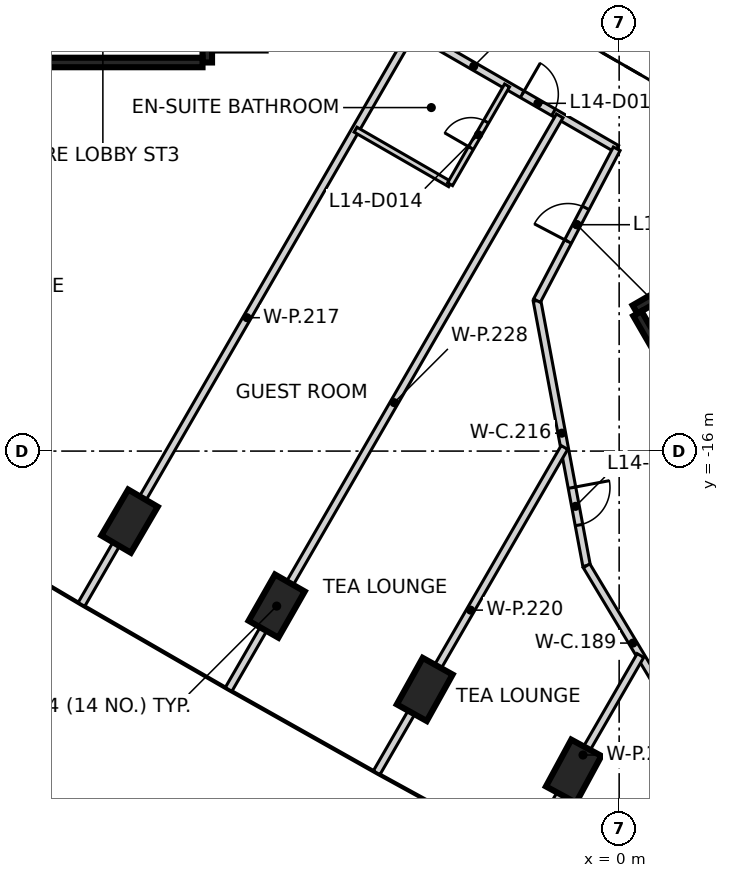
"""IFC4 building model, lengths in metres.
Left out: names, types, materials, properties, quantities, classifications, styles, units other than length and angle.
Written with IfcOpenShell. Run it as: python <this file> out.ifc"""

import sys

from ifc_helpers import new_model, si_unit, direction, frame, frame_2d, origin, origin_2d, place, context, subcontext, project, spatial, rectangle, extrude, element, fill, save


model = new_model("IFC4")
c1 = context("Model", 3, precision=1e-05, world=origin(), true_north=direction((0.0, 1.0)))
c2 = subcontext(c1, "Body", "Model", "MODEL_VIEW")
j1 = project(units=[si_unit("LENGTHUNIT", "METRE"), si_unit("PLANEANGLEUNIT", "RADIAN")], contexts=[c1])
p1 = place(None, origin())
s1 = spatial("IfcSite", under=j1, at=p1, CompositionType="ELEMENT")
p2 = place(p1, origin())
s2 = spatial("IfcBuilding", under=s1, at=p2, CompositionType="ELEMENT")
p3 = place(p2, frame((0.0, 0.0, 63.8)))
s3 = spatial("IfcBuildingStorey", under=s2, at=p3, CompositionType="ELEMENT", Elevation=63.8)
for number, where, z_axis, x_axis in (
    (1, (-12.883, -17.844, -0.475), (0.0, 0.0, 1.0), (0.505, 0.863, 0.0)),
    (2, (-9.011, -20.079, -0.475), (0.0, 0.0, 1.0), (0.495, 0.869, 0.0)),
    (3, (-5.116, -22.272, -0.475), (0.0, 0.0, 1.0), (0.486, 0.874, 0.0)),
    (4, (-1.197, -24.423, -0.475), (0.0, 0.0, 1.0), (0.476, 0.879, 0.0)),
):
    element("IfcColumn", number, at=place(p3, frame(where, z_axis=z_axis, x_axis=x_axis)), inside=s3, PredefinedType="COLUMN", context=c2, shape_type="SweptSolid", body=[
        extrude(rectangle(XDim=1.4, YDim=0.9, at=origin_2d()), origin(), (0.0, 0.0, 1.0), 3.6),
    ])
p4 = place(p3, frame((-10.837, 5.775, 0.0), z_axis=(0.0, 0.0, 1.0), x_axis=(0.0, -1.0, 0.0)))
e5 = element("IfcWall", 5, at=p4, inside=s3, PredefinedType="SHEAR", context=c2, shape_type="SweptSolid", body=[
    extrude(rectangle(XDim=11.55, YDim=0.25, at=frame_2d((5.775, 0.0))), origin(), (0.0, 0.0, 1.0), 3.125),
])
p5 = place(p4, frame((10.025, 0.0, 0.0)))
e6 = element("IfcOpeningElement", 6, at=p5, cuts=e5, PredefinedType="OPENING", context=c2, shape_type="SweptSolid", body=[
    extrude(rectangle(XDim=1.2, YDim=2.1, at=frame_2d((0.6, 1.05))), frame((0.0, 0.135, 0.0), z_axis=(0.0, -1.0, 0.0), x_axis=(1.0, 0.0, 0.0)), (0.0, 0.0, 1.0), 0.27),
])
p6 = place(p4, frame((8.725, 0.0, 0.0)))
e7 = element("IfcOpeningElement", 7, at=p6, cuts=e5, PredefinedType="OPENING", context=c2, shape_type="SweptSolid", body=[
    extrude(rectangle(XDim=1.2, YDim=2.1, at=frame_2d((0.6, 1.05))), frame((0.0, 0.135, 0.0), z_axis=(0.0, -1.0, 0.0), x_axis=(1.0, 0.0, 0.0)), (0.0, 0.0, 1.0), 0.27),
])
p7 = place(p3, frame((-10.963, -5.775, 0.0), z_axis=(0.0, 0.0, 1.0), x_axis=(-1.0, 0.0, 0.0)))
e8 = element("IfcWall", 8, at=p7, inside=s3, PredefinedType="SHEAR", context=c2, shape_type="SweptSolid", body=[
    extrude(rectangle(XDim=5.225, YDim=0.25, at=frame_2d((2.612, 0.0))), origin(), (0.0, 0.0, 1.0), 3.125),
])
p8 = place(p3, frame((0.417, -12.273, 0.0), z_axis=(0.0, 0.0, 1.0), x_axis=(0.866021906294, 0.500006057782, 0.0)))
e9 = element("IfcWall", 9, at=p8, inside=s3, PredefinedType="SHEAR", context=c2, shape_type="SweptSolid", body=[
    extrude(rectangle(XDim=11.55, YDim=0.25, at=frame_2d((5.775, 0.0))), origin(), (0.0, 0.0, 1.0), 3.125),
])
p9 = place(p8, frame((10.025, 0.0, 0.0)))
e10 = element("IfcOpeningElement", 10, at=p9, cuts=e9, PredefinedType="OPENING", context=c2, shape_type="SweptSolid", body=[
    extrude(rectangle(XDim=1.2, YDim=2.1, at=frame_2d((0.6, 1.05))), frame((0.0, 0.135, 0.0), z_axis=(0.0, -1.0, 0.0), x_axis=(1.0, 0.0, 0.0)), (0.0, 0.0, 1.0), 0.27),
])
p10 = place(p8, frame((8.725, 0.0, 0.0)))
e11 = element("IfcOpeningElement", 11, at=p10, cuts=e9, PredefinedType="OPENING", context=c2, shape_type="SweptSolid", body=[
    extrude(rectangle(XDim=1.2, YDim=2.1, at=frame_2d((0.6, 1.05))), frame((0.0, 0.135, 0.0), z_axis=(0.0, -1.0, 0.0), x_axis=(1.0, 0.0, 0.0)), (0.0, 0.0, 1.0), 0.27),
])
p11 = place(p3, frame((3.235, -17.153, 0.0), z_axis=(0.0, 0.0, 1.0), x_axis=(-0.500008851346, 0.866020293397, 0.0)))
e12 = element("IfcWall", 12, at=p11, inside=s3, PredefinedType="SHEAR", context=c2, shape_type="SweptSolid", body=[
    extrude(rectangle(XDim=5.51, YDim=0.25, at=frame_2d((2.755, 0.0))), origin(), (0.0, 0.0, 1.0), 3.125),
])
p12 = place(p3, frame((-7.589, -3.702, 0.0), z_axis=(0.0, 0.0, 1.0), x_axis=(0.865995139556, -0.500052415518, 0.0)))
e13 = element("IfcWall", 13, at=p12, inside=s3, PredefinedType="PARTITIONING", context=c2, shape_type="SweptSolid", body=[
    extrude(rectangle(XDim=8.689, YDim=0.2, at=frame_2d((4.344, 0.0))), origin(), (0.0, 0.0, 1.0), 3.125),
])
p13 = place(p12, frame((0.749, 0.0, 0.0)))
e14 = element("IfcOpeningElement", 14, at=p13, cuts=e13, PredefinedType="OPENING", context=c2, shape_type="SweptSolid", body=[
    extrude(rectangle(XDim=1.0, YDim=2.1, at=frame_2d((0.5, 1.05))), frame((0.0, 0.11, 0.0), z_axis=(0.0, -1.0, 0.0), x_axis=(1.0, 0.0, 0.0)), (0.0, 0.0, 1.0), 0.22),
])
p14 = place(p12, frame((5.819, 0.0, 0.0)))
e15 = element("IfcOpeningElement", 15, at=p14, cuts=e13, PredefinedType="OPENING", context=c2, shape_type="SweptSolid", body=[
    extrude(rectangle(XDim=0.95, YDim=2.1, at=frame_2d((0.475, 1.05))), frame((0.0, 0.11, 0.0), z_axis=(0.0, -1.0, 0.0), x_axis=(1.0, 0.0, 0.0)), (0.0, 0.0, 1.0), 0.22),
])
p15 = place(p3, frame((-2.162, -12.042, 0.0), z_axis=(0.0, 0.0, 1.0), x_axis=(0.183949825522, -0.982935634561, 0.0)))
e16 = element("IfcWall", 16, at=p15, inside=s3, PredefinedType="PARTITIONING", context=c2, shape_type="SweptSolid", body=[
    extrude(rectangle(XDim=7.094, YDim=0.2, at=frame_2d((3.547, 0.0))), origin(), (0.0, 0.0, 1.0), 3.125),
])
p16 = place(p15, frame((5.006, 0.0, 0.0)))
e17 = element("IfcOpeningElement", 17, at=p16, cuts=e16, PredefinedType="OPENING", context=c2, shape_type="SweptSolid", body=[
    extrude(rectangle(XDim=1.0, YDim=2.1, at=frame_2d((0.5, 1.05))), frame((0.0, 0.11, 0.0), z_axis=(0.0, -1.0, 0.0), x_axis=(1.0, 0.0, 0.0)), (0.0, 0.0, 1.0), 0.22),
])
p17 = place(p3, frame((-2.162, -12.041, 0.0), z_axis=(0.0, 0.0, 1.0), x_axis=(0.464956890881, 0.885333321197, 0.0)))
e18 = element("IfcWall", 18, at=p17, inside=s3, PredefinedType="PARTITIONING", context=c2, shape_type="SweptSolid", body=[
    extrude(rectangle(XDim=4.512, YDim=0.2, at=frame_2d((2.256, 0.0))), origin(), (0.0, 0.0, 1.0), 3.125),
])
p18 = place(p17, frame((1.756, 0.0, 0.0)))
e19 = element("IfcOpeningElement", 19, at=p18, cuts=e18, PredefinedType="OPENING", context=c2, shape_type="SweptSolid", body=[
    extrude(rectangle(XDim=1.0, YDim=2.1, at=frame_2d((0.5, 1.05))), frame((0.0, 0.11, 0.0), z_axis=(0.0, -1.0, 0.0), x_axis=(1.0, 0.0, 0.0)), (0.0, 0.0, 1.0), 0.22),
])
p19 = place(p3, frame((-0.858, -19.017, 0.0), z_axis=(0.0, 0.0, 1.0), x_axis=(0.514647068805, -0.857402119528, 0.0)))
e20 = element("IfcWall", 20, at=p19, inside=s3, PredefinedType="PARTITIONING", context=c2, shape_type="SweptSolid", body=[
    extrude(rectangle(XDim=4.745, YDim=0.2, at=frame_2d((2.373, 0.0))), origin(), (0.0, 0.0, 1.0), 3.125),
])
p20 = place(p3, frame((-14.148, -20.035, 0.0), z_axis=(0.0, 0.0, 1.0), x_axis=(0.500005855417, 0.866022023131, 0.0)))
e21 = element("IfcWall", 21, at=p20, inside=s3, PredefinedType="PARTITIONING", context=c2, shape_type="SweptSolid", body=[
    extrude(rectangle(XDim=17.425, YDim=0.2, at=frame_2d((8.712, 0.0))), origin(), (0.0, 0.0, 1.0), 3.125),
])
p21 = place(p3, frame((-10.276, -22.271, 0.0), z_axis=(0.0, 0.0, 1.0), x_axis=(0.49999372146, 0.866029028671, 0.0)))
e22 = element("IfcWall", 22, at=p21, inside=s3, PredefinedType="PARTITIONING", context=c2, shape_type="SweptSolid", body=[
    extrude(rectangle(XDim=17.425, YDim=0.2, at=frame_2d((8.712, 0.0))), origin(), (0.0, 0.0, 1.0), 3.125),
])
p22 = place(p3, frame((-6.381, -24.464, 0.0), z_axis=(0.0, 0.0, 1.0), x_axis=(0.500007577232, 0.866021029023, 0.0)))
e23 = element("IfcWall", 23, at=p22, inside=s3, PredefinedType="PARTITIONING", context=c2, shape_type="SweptSolid", body=[
    extrude(rectangle(XDim=9.883, YDim=0.2, at=frame_2d((4.941, 0.0))), origin(), (0.0, 0.0, 1.0), 3.125),
])
p23 = place(p3, frame((-2.462, -26.615, 0.0), z_axis=(0.0, 0.0, 1.0), x_axis=(0.49992636536, 0.86606791259, 0.0)))
e24 = element("IfcWall", 24, at=p23, inside=s3, PredefinedType="PARTITIONING", context=c2, shape_type="SweptSolid", body=[
    extrude(rectangle(XDim=6.046, YDim=0.2, at=frame_2d((3.023, 0.0))), origin(), (0.0, 0.0, 1.0), 3.125),
])
p24 = place(p3, frame((-6.936, -7.543, 0.0), z_axis=(0.0, 0.0, 1.0), x_axis=(0.866153027342, -0.499778884334, 0.0)))
e25 = element("IfcWall", 25, at=p24, inside=s3, PredefinedType="PARTITIONING", context=c2, shape_type="SweptSolid", body=[
    extrude(rectangle(XDim=2.871, YDim=0.15, at=frame_2d((1.436, 0.0))), origin(), (0.0, 0.0, 1.0), 3.125),
])
p25 = place(p3, frame((-4.449, -8.978, 0.0), z_axis=(0.0, 0.0, 1.0), x_axis=(0.499745940409, 0.866172035478, 0.0)))
e26 = element("IfcWall", 26, at=p25, inside=s3, PredefinedType="PARTITIONING", context=c2, shape_type="SweptSolid", body=[
    extrude(rectangle(XDim=3.0, YDim=0.15, at=frame_2d((1.5, 0.0))), origin(), (0.0, 0.0, 1.0), 3.125),
])
p26 = place(p25, frame((1.1, 0.0, 0.0)))
e27 = element("IfcOpeningElement", 27, at=p26, cuts=e26, PredefinedType="OPENING", context=c2, shape_type="SweptSolid", body=[
    extrude(rectangle(XDim=0.8, YDim=2.1, at=frame_2d((0.4, 1.05))), frame((0.0, 0.085, 0.0), z_axis=(0.0, -1.0, 0.0), x_axis=(1.0, 0.0, 0.0)), (0.0, 0.0, 1.0), 0.17),
])
p27 = place(p14, frame((0.95, 0.0, 0.0), z_axis=(0.0, 0.0, 1.0), x_axis=(-1.0, 0.0, 0.0)))
e28 = element("IfcDoor", 28, at=p27, inside=s3, OperationType="SINGLE_SWING_LEFT", PredefinedType="DOOR", context=c2, shape_type="SweptSolid", body=[
    extrude(rectangle(XDim=0.95, YDim=2.1, at=frame_2d((0.475, 1.05))), frame((0.0, 0.025, 0.0), z_axis=(0.0, -1.0, 0.0), x_axis=(1.0, 0.0, 0.0)), (0.0, 0.0, 1.0), 0.05),
])
fill(e15, e28)
p28 = place(p26, origin())
e29 = element("IfcDoor", 29, at=p28, inside=s3, OperationType="SINGLE_SWING_LEFT", PredefinedType="DOOR", context=c2, shape_type="SweptSolid", body=[
    extrude(rectangle(XDim=0.8, YDim=2.1, at=frame_2d((0.4, 1.05))), frame((0.0, 0.025, 0.0), z_axis=(0.0, -1.0, 0.0), x_axis=(1.0, 0.0, 0.0)), (0.0, 0.0, 1.0), 0.05),
])
fill(e27, e29)
p29 = place(p18, origin())
e30 = element("IfcDoor", 30, at=p29, inside=s3, OperationType="SINGLE_SWING_LEFT", PredefinedType="DOOR", context=c2, shape_type="SweptSolid", body=[
    extrude(rectangle(XDim=1.0, YDim=2.1, at=frame_2d((0.5, 1.05))), frame((0.0, 0.025, 0.0), z_axis=(0.0, -1.0, 0.0), x_axis=(1.0, 0.0, 0.0)), (0.0, 0.0, 1.0), 0.05),
])
fill(e19, e30)
p30 = place(p16, frame((1.0, 0.0, 0.0), z_axis=(0.0, 0.0, 1.0), x_axis=(-1.0, 0.0, 0.0)))
e31 = element("IfcDoor", 31, at=p30, inside=s3, OperationType="SINGLE_SWING_LEFT", PredefinedType="DOOR", context=c2, shape_type="SweptSolid", body=[
    extrude(rectangle(XDim=1.0, YDim=2.1, at=frame_2d((0.5, 1.05))), frame((0.0, 0.025, 0.0), z_axis=(0.0, -1.0, 0.0), x_axis=(1.0, 0.0, 0.0)), (0.0, 0.0, 1.0), 0.05),
])
fill(e17, e31)
save(model, sys.argv[1])
